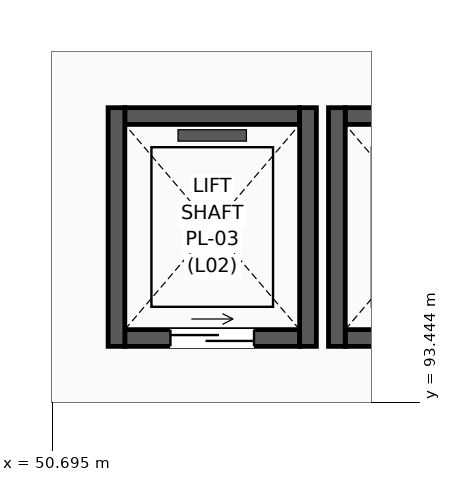
"""IFC4 building model, lengths in metres.
Left out: names, types, materials, properties, quantities, classifications, styles, units other than length and angle.
Written with IfcOpenShell. Run it as: python <this file> out.ifc"""

import sys

from ifc_helpers import new_model, si_unit, direction, frame, frame_2d, origin, place, context, subcontext, project, spatial, rectangle, extrude, element, fill, save


model = new_model("IFC4")
c1 = context("Model", 3, precision=1e-05, world=origin(), true_north=direction((0.0, 1.0)))
c2 = subcontext(c1, "Body", "Model", "MODEL_VIEW")
j1 = project(units=[si_unit("LENGTHUNIT", "METRE"), si_unit("PLANEANGLEUNIT", "RADIAN")], contexts=[c1])
p1 = place(None, origin())
s1 = spatial("IfcSite", under=j1, at=p1, CompositionType="ELEMENT")
p2 = place(p1, origin())
s2 = spatial("IfcBuilding", under=s1, at=p2, CompositionType="ELEMENT")
p3 = place(p2, frame((0.0, 0.0, 10.2)))
s3 = spatial("IfcBuildingStorey", under=s2, at=p3, CompositionType="ELEMENT", Elevation=10.2)
p4 = place(p3, frame((51.65, 94.29, 0.0), z_axis=(0.0, 0.0, 1.0), x_axis=(1.0, 0.0, 0.0)))
e1 = element("IfcWall", 1, at=p4, inside=s3, PredefinedType="SOLIDWALL", context=c2, shape_type="SweptSolid", body=[
    extrude(rectangle(XDim=2.3, YDim=0.22, at=frame_2d((1.15, 0.0))), origin(), (0.0, 0.0, 1.0), 4.225),
])
p5 = place(p4, frame((0.6, 0.0, 0.0)))
e2 = element("IfcOpeningElement", 2, at=p5, cuts=e1, PredefinedType="OPENING", context=c2, shape_type="SweptSolid", body=[
    extrude(rectangle(XDim=1.1, YDim=2.2, at=frame_2d((0.55, 1.1))), frame((0.0, 0.12, 0.0), z_axis=(0.0, -1.0, 0.0), x_axis=(1.0, 0.0, 0.0)), (0.0, 0.0, 1.0), 0.24),
])
p6 = place(p3, frame((51.65, 97.21, 0.0), z_axis=(0.0, 0.0, 1.0), x_axis=(1.0, 0.0, 0.0)))
e3 = element("IfcWall", 3, at=p6, inside=s3, PredefinedType="SOLIDWALL", context=c2, shape_type="SweptSolid", body=[
    extrude(rectangle(XDim=2.3, YDim=0.22, at=frame_2d((1.15, 0.0))), origin(), (0.0, 0.0, 1.0), 4.225),
])
for number, where, z_axis, x_axis in (
    (4, (51.54, 94.18, 0.0), (0.0, 0.0, 1.0), (0.0, 1.0, 0.0)),
    (5, (54.06, 94.18, 0.0), (0.0, 0.0, 1.0), (0.0, 1.0, 0.0)),
):
    element("IfcWall", number, at=place(p3, frame(where, z_axis=z_axis, x_axis=x_axis)), inside=s3, PredefinedType="SOLIDWALL", context=c2, shape_type="SweptSolid", body=[
        extrude(rectangle(XDim=3.14, YDim=0.22, at=frame_2d((1.57, 0.0))), origin(), (0.0, 0.0, 1.0), 4.225),
    ])
p7 = place(p3, frame((54.55, 94.29, 0.0), z_axis=(0.0, 0.0, 1.0), x_axis=(1.0, 0.0, 0.0)))
e6 = element("IfcWall", 6, at=p7, inside=s3, PredefinedType="SOLIDWALL", context=c2, shape_type="SweptSolid", body=[
    extrude(rectangle(XDim=2.3, YDim=0.22, at=frame_2d((1.15, 0.0))), origin(), (0.0, 0.0, 1.0), 4.225),
])
p8 = place(p7, frame((0.6, 0.0, 0.0)))
e7 = element("IfcOpeningElement", 7, at=p8, cuts=e6, PredefinedType="OPENING", context=c2, shape_type="SweptSolid", body=[
    extrude(rectangle(XDim=1.1, YDim=2.2, at=frame_2d((0.55, 1.1))), frame((0.0, 0.12, 0.0), z_axis=(0.0, -1.0, 0.0), x_axis=(1.0, 0.0, 0.0)), (0.0, 0.0, 1.0), 0.24),
])
p9 = place(p3, frame((54.55, 97.21, 0.0), z_axis=(0.0, 0.0, 1.0), x_axis=(1.0, 0.0, 0.0)))
e8 = element("IfcWall", 8, at=p9, inside=s3, PredefinedType="SOLIDWALL", context=c2, shape_type="SweptSolid", body=[
    extrude(rectangle(XDim=2.3, YDim=0.22, at=frame_2d((1.15, 0.0))), origin(), (0.0, 0.0, 1.0), 4.225),
])
p10 = place(p3, frame((54.44, 94.18, 0.0), z_axis=(0.0, 0.0, 1.0), x_axis=(0.0, 1.0, 0.0)))
e9 = element("IfcWall", 9, at=p10, inside=s3, PredefinedType="SOLIDWALL", context=c2, shape_type="SweptSolid", body=[
    extrude(rectangle(XDim=3.14, YDim=0.22, at=frame_2d((1.57, 0.0))), origin(), (0.0, 0.0, 1.0), 4.225),
])
p11 = place(p5, origin())
e10 = element("IfcDoor", 10, at=p11, inside=s3, OperationType="SLIDING_TO_LEFT", PredefinedType="DOOR", context=c2, shape_type="SweptSolid", body=[
    extrude(rectangle(XDim=1.1, YDim=2.2, at=frame_2d((0.55, 1.1))), frame((0.0, 0.025, 0.0), z_axis=(0.0, -1.0, 0.0), x_axis=(1.0, 0.0, 0.0)), (0.0, 0.0, 1.0), 0.05),
])
fill(e2, e10)
save(model, sys.argv[1])
